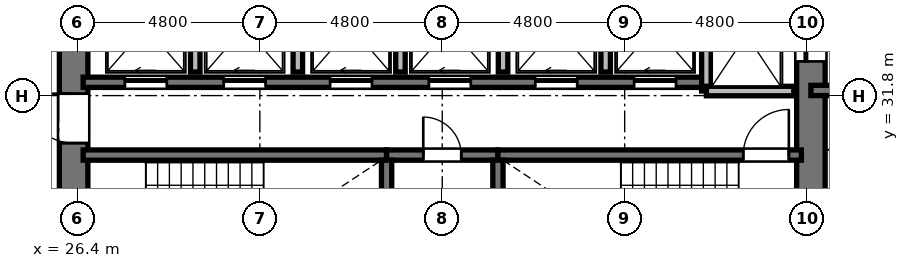
"""IFC4 building model, lengths in metres.
Left out: names, types, materials, properties, quantities, classifications, styles, units other than length and angle.
Written with IfcOpenShell. Run it as: python <this file> out.ifc"""

import sys

from ifc_helpers import new_model, si_unit, direction, frame, frame_2d, origin, place, context, subcontext, project, spatial, rectangle, extrude, element, fill, save


model = new_model("IFC4")
c1 = context("Model", 3, precision=1e-05, world=origin(), true_north=direction((0.0, 1.0)))
c2 = subcontext(c1, "Body", "Model", "MODEL_VIEW")
j1 = project(units=[si_unit("LENGTHUNIT", "METRE"), si_unit("PLANEANGLEUNIT", "RADIAN")], contexts=[c1])
p1 = place(None, origin())
s1 = spatial("IfcSite", under=j1, at=p1, CompositionType="ELEMENT")
p2 = place(p1, origin())
s2 = spatial("IfcBuilding", under=s1, at=p2, CompositionType="ELEMENT")
p3 = place(p2, frame((0.0, 0.0, 99.984)))
s3 = spatial("IfcBuildingStorey", under=s2, at=p3, CompositionType="ELEMENT", Elevation=99.984)
p4 = place(p3, frame((26.3, 20.95, 0.0), z_axis=(0.0, 0.0, 1.0), x_axis=(0.0, 1.0, 0.0)))
e1 = element("IfcWall", 1, at=p4, inside=s3, PredefinedType="SHEAR", context=c2, shape_type="SweptSolid", body=[
    extrude(rectangle(XDim=14.1, YDim=0.75, at=frame_2d((7.05, 0.0))), origin(), (0.0, 0.0, 1.0), 3.648),
])
p5 = place(p4, frame((6.5, 0.0, 0.0)))
e2 = element("IfcOpeningElement", 2, at=p5, cuts=e1, PredefinedType="OPENING", context=c2, shape_type="SweptSolid", body=[
    extrude(rectangle(XDim=1.2, YDim=2.15, at=frame_2d((0.6, 1.075))), frame((0.0, 0.385, 0.0), z_axis=(0.0, -1.0, 0.0), x_axis=(1.0, 0.0, 0.0)), (0.0, 0.0, 1.0), 0.77),
])
p6 = place(p4, frame((9.6, 0.0, 0.0)))
e3 = element("IfcOpeningElement", 3, at=p6, cuts=e1, PredefinedType="OPENING", context=c2, shape_type="SweptSolid", body=[
    extrude(rectangle(XDim=1.3, YDim=2.2, at=frame_2d((0.65, 1.1))), frame((0.0, 0.385, 0.0), z_axis=(0.0, -1.0, 0.0), x_axis=(1.0, 0.0, 0.0)), (0.0, 0.0, 1.0), 0.77),
])
p7 = place(p4, frame((3.26, 0.0, 0.0)))
e4 = element("IfcOpeningElement", 4, at=p7, cuts=e1, PredefinedType="OPENING", context=c2, shape_type="SweptSolid", body=[
    extrude(rectangle(XDim=1.3, YDim=2.2, at=frame_2d((0.65, 1.1))), frame((0.0, 0.385, 0.0), z_axis=(0.0, -1.0, 0.0), x_axis=(1.0, 0.0, 0.0)), (0.0, 0.0, 1.0), 0.77),
])
p8 = place(p3, frame((45.7, 20.95, 0.0), z_axis=(0.0, 0.0, 1.0), x_axis=(0.0, 1.0, 0.0)))
e5 = element("IfcWall", 5, at=p8, inside=s3, PredefinedType="SHEAR", context=c2, shape_type="SweptSolid", body=[
    extrude(rectangle(XDim=14.1, YDim=0.75, at=frame_2d((7.05, 0.0))), origin(), (0.0, 0.0, 1.0), 3.648),
])
p9 = place(p8, frame((11.75, 0.0, 0.0)))
e6 = element("IfcOpeningElement", 6, at=p9, cuts=e5, PredefinedType="OPENING", context=c2, shape_type="SweptSolid", body=[
    extrude(rectangle(XDim=1.4, YDim=2.3, at=frame_2d((0.7, 1.15))), frame((0.0, 0.385, 0.0), z_axis=(0.0, -1.0, 0.0), x_axis=(1.0, 0.0, 0.0)), (0.0, 0.0, 1.0), 0.77),
])
p10 = place(p8, frame((0.95, 0.0, 0.0)))
e7 = element("IfcOpeningElement", 7, at=p10, cuts=e5, PredefinedType="OPENING", context=c2, shape_type="SweptSolid", body=[
    extrude(rectangle(XDim=1.4, YDim=2.3, at=frame_2d((0.7, 1.15))), frame((0.0, 0.385, 0.0), z_axis=(0.0, -1.0, 0.0), x_axis=(1.0, 0.0, 0.0)), (0.0, 0.0, 1.0), 0.77),
])
p11 = place(p3, frame((26.55, 30.235, 0.0), z_axis=(0.0, 0.0, 1.0), x_axis=(1.0, 0.0, 0.0)))
e8 = element("IfcWall", 8, at=p11, inside=s3, PredefinedType="SHEAR", context=c2, shape_type="SweptSolid", body=[
    extrude(rectangle(XDim=7.985, YDim=0.27, at=frame_2d((3.992, 0.0))), origin(), (0.0, 0.0, 1.0), 3.648),
])
p12 = place(p3, frame((34.535, 30.235, 0.0), z_axis=(0.0, 0.0, 1.0), x_axis=(1.0, 0.0, 0.0)))
e9 = element("IfcWall", 9, at=p12, inside=s3, PredefinedType="SHEAR", context=c2, shape_type="SweptSolid", body=[
    extrude(rectangle(XDim=2.93, YDim=0.27, at=frame_2d((1.465, 0.0))), origin(), (0.0, 0.0, 1.0), 3.648),
])
p13 = place(p12, frame((0.965, 0.0, 0.0)))
e10 = element("IfcOpeningElement", 10, at=p13, cuts=e9, PredefinedType="OPENING", context=c2, shape_type="SweptSolid", body=[
    extrude(rectangle(XDim=1.0, YDim=2.1, at=frame_2d((0.5, 1.05))), frame((0.0, 0.145, 0.0), z_axis=(0.0, -1.0, 0.0), x_axis=(1.0, 0.0, 0.0)), (0.0, 0.0, 1.0), 0.29),
])
p14 = place(p3, frame((37.465, 30.235, 0.0), z_axis=(0.0, 0.0, 1.0), x_axis=(1.0, 0.0, 0.0)))
e11 = element("IfcWall", 11, at=p14, inside=s3, PredefinedType="SHEAR", context=c2, shape_type="SweptSolid", body=[
    extrude(rectangle(XDim=7.985, YDim=0.27, at=frame_2d((3.992, 0.0))), origin(), (0.0, 0.0, 1.0), 3.648),
])
p15 = place(p14, frame((6.455, 0.0, 0.0)))
e12 = element("IfcOpeningElement", 12, at=p15, cuts=e11, PredefinedType="OPENING", context=c2, shape_type="SweptSolid", body=[
    extrude(rectangle(XDim=1.2, YDim=2.15, at=frame_2d((0.6, 1.075))), frame((0.0, 0.145, 0.0), z_axis=(0.0, -1.0, 0.0), x_axis=(1.0, 0.0, 0.0)), (0.0, 0.0, 1.0), 0.29),
])
for number, where, z_axis, x_axis in (
    (13, (34.535, 26.02, 0.0), (0.0, 0.0, 1.0), (0.0, 1.0, 0.0)),
    (14, (37.465, 26.02, 0.0), (0.0, 0.0, 1.0), (0.0, 1.0, 0.0)),
):
    element("IfcWall", number, at=place(p3, frame(where, z_axis=z_axis, x_axis=x_axis)), inside=s3, PredefinedType="SHEAR", context=c2, shape_type="SweptSolid", body=[
        extrude(rectangle(XDim=4.08, YDim=0.27, at=frame_2d((2.04, 0.0))), origin(), (0.0, 0.0, 1.0), 3.648),
    ])
p16 = place(p3, frame((26.55, 32.15, 0.0), z_axis=(0.0, 0.0, 1.0), x_axis=(1.0, 0.0, 0.0)))
e15 = element("IfcWall", 15, at=p16, inside=s3, PredefinedType="SHEAR", context=c2, shape_type="SweptSolid", body=[
    extrude(rectangle(XDim=16.4, YDim=0.27, at=frame_2d((8.2, 0.0))), origin(), (0.0, 0.0, 1.0), 3.648),
])
p17 = place(p16, frame((1.1, 0.0, 0.0)))
e16 = element("IfcOpeningElement", 16, at=p17, cuts=e15, PredefinedType="OPENING", context=c2, shape_type="SweptSolid", body=[
    extrude(rectangle(XDim=1.1, YDim=2.2, at=frame_2d((0.55, 1.1))), frame((0.0, 0.145, 0.0), z_axis=(0.0, -1.0, 0.0), x_axis=(1.0, 0.0, 0.0)), (0.0, 0.0, 1.0), 0.29),
])
p18 = place(p16, frame((3.7, 0.0, 0.0)))
e17 = element("IfcOpeningElement", 17, at=p18, cuts=e15, PredefinedType="OPENING", context=c2, shape_type="SweptSolid", body=[
    extrude(rectangle(XDim=1.1, YDim=2.2, at=frame_2d((0.55, 1.1))), frame((0.0, 0.145, 0.0), z_axis=(0.0, -1.0, 0.0), x_axis=(1.0, 0.0, 0.0)), (0.0, 0.0, 1.0), 0.29),
])
p19 = place(p16, frame((6.5, 0.0, 0.0)))
e18 = element("IfcOpeningElement", 18, at=p19, cuts=e15, PredefinedType="OPENING", context=c2, shape_type="SweptSolid", body=[
    extrude(rectangle(XDim=1.1, YDim=2.2, at=frame_2d((0.55, 1.1))), frame((0.0, 0.145, 0.0), z_axis=(0.0, -1.0, 0.0), x_axis=(1.0, 0.0, 0.0)), (0.0, 0.0, 1.0), 0.29),
])
p20 = place(p16, frame((9.1, 0.0, 0.0)))
e19 = element("IfcOpeningElement", 19, at=p20, cuts=e15, PredefinedType="OPENING", context=c2, shape_type="SweptSolid", body=[
    extrude(rectangle(XDim=1.1, YDim=2.2, at=frame_2d((0.55, 1.1))), frame((0.0, 0.145, 0.0), z_axis=(0.0, -1.0, 0.0), x_axis=(1.0, 0.0, 0.0)), (0.0, 0.0, 1.0), 0.29),
])
p21 = place(p16, frame((11.9, 0.0, 0.0)))
e20 = element("IfcOpeningElement", 20, at=p21, cuts=e15, PredefinedType="OPENING", context=c2, shape_type="SweptSolid", body=[
    extrude(rectangle(XDim=1.1, YDim=2.2, at=frame_2d((0.55, 1.1))), frame((0.0, 0.145, 0.0), z_axis=(0.0, -1.0, 0.0), x_axis=(1.0, 0.0, 0.0)), (0.0, 0.0, 1.0), 0.29),
])
p22 = place(p16, frame((14.5, 0.0, 0.0)))
e21 = element("IfcOpeningElement", 21, at=p22, cuts=e15, PredefinedType="OPENING", context=c2, shape_type="SweptSolid", body=[
    extrude(rectangle(XDim=1.1, YDim=2.2, at=frame_2d((0.55, 1.1))), frame((0.0, 0.145, 0.0), z_axis=(0.0, -1.0, 0.0), x_axis=(1.0, 0.0, 0.0)), (0.0, 0.0, 1.0), 0.29),
])
p23 = place(p3, frame((42.95, 31.92, 0.0), z_axis=(0.0, 0.0, 1.0), x_axis=(0.0, 1.0, 0.0)))
e22 = element("IfcWall", 22, at=p23, inside=s3, PredefinedType="SOLIDWALL", context=c2, shape_type="SweptSolid", body=[
    extrude(rectangle(XDim=3.18, YDim=0.25, at=frame_2d((1.59, 0.0))), origin(), (0.0, 0.0, 1.0), 3.428),
])
p24 = place(p3, frame((42.95, 31.92, 0.0), z_axis=(0.0, 0.0, 1.0), x_axis=(1.0, 0.0, 0.0)))
e23 = element("IfcWall", 23, at=p24, inside=s3, PredefinedType="SOLIDWALL", context=c2, shape_type="SweptSolid", body=[
    extrude(rectangle(XDim=2.3, YDim=0.25, at=frame_2d((1.15, 0.0))), origin(), (0.0, 0.0, 1.0), 3.428),
])
for number, where, z_axis, x_axis in (
    (24, (29.5, 32.42, 0.0), (0.0, 0.0, 1.0), (0.0, 1.0, 0.0)),
    (25, (32.2, 32.42, 0.0), (0.0, 0.0, 1.0), (0.0, 1.0, 0.0)),
    (26, (34.9, 32.42, 0.0), (0.0, 0.0, 1.0), (0.0, 1.0, 0.0)),
    (27, (37.6, 32.42, 0.0), (0.0, 0.0, 1.0), (0.0, 1.0, 0.0)),
    (28, (40.3, 32.42, 0.0), (0.0, 0.0, 1.0), (0.0, 1.0, 0.0)),
):
    element("IfcWall", number, at=place(p3, frame(where, z_axis=z_axis, x_axis=x_axis)), inside=s3, PredefinedType="SOLIDWALL", context=c2, shape_type="SweptSolid", body=[
        extrude(rectangle(XDim=2.68, YDim=0.25, at=frame_2d((1.34, 0.0))), origin(), (0.0, 0.0, 1.0), 3.428),
    ])
p25 = place(p3, frame((45.7, 31.935, 0.0), z_axis=(0.0, 0.0, 1.0), x_axis=(1.0, 0.0, 0.0)))
e29 = element("IfcWall", 29, at=p25, inside=s3, PredefinedType="SHEAR", context=c2, shape_type="SweptSolid", body=[
    extrude(rectangle(XDim=4.715, YDim=0.27, at=frame_2d((2.357, 0.0))), origin(), (0.0, 0.0, 1.0), 3.648),
])
p26 = place(p15, origin())
e30 = element("IfcDoor", 30, at=p26, inside=s3, OperationType="SINGLE_SWING_RIGHT", PredefinedType="DOOR", context=c2, shape_type="SweptSolid", body=[
    extrude(rectangle(XDim=1.2, YDim=2.15, at=frame_2d((0.6, 1.075))), frame((0.0, 0.025, 0.0), z_axis=(0.0, -1.0, 0.0), x_axis=(1.0, 0.0, 0.0)), (0.0, 0.0, 1.0), 0.05),
])
fill(e12, e30)
p27 = place(p13, origin())
e31 = element("IfcDoor", 31, at=p27, inside=s3, OperationType="SINGLE_SWING_LEFT", PredefinedType="DOOR", context=c2, shape_type="SweptSolid", body=[
    extrude(rectangle(XDim=1.0, YDim=2.1, at=frame_2d((0.5, 1.05))), frame((0.0, 0.025, 0.0), z_axis=(0.0, -1.0, 0.0), x_axis=(1.0, 0.0, 0.0)), (0.0, 0.0, 1.0), 0.05),
])
fill(e10, e31)
p28 = place(p6, origin())
e32 = element("IfcDoor", 32, at=p28, inside=s3, OperationType="SINGLE_SWING_RIGHT", PredefinedType="DOOR", context=c2, shape_type="SweptSolid", body=[
    extrude(rectangle(XDim=1.3, YDim=2.2, at=frame_2d((0.65, 1.1))), frame((0.0, 0.025, 0.0), z_axis=(0.0, -1.0, 0.0), x_axis=(1.0, 0.0, 0.0)), (0.0, 0.0, 1.0), 0.05),
])
fill(e3, e32)
p29 = place(p17, origin())
e33 = element("IfcDoor", 33, at=p29, inside=s3, OperationType="SLIDING_TO_LEFT", PredefinedType="DOOR", context=c2, shape_type="SweptSolid", body=[
    extrude(rectangle(XDim=1.1, YDim=2.2, at=frame_2d((0.55, 1.1))), frame((0.0, 0.025, 0.0), z_axis=(0.0, -1.0, 0.0), x_axis=(1.0, 0.0, 0.0)), (0.0, 0.0, 1.0), 0.05),
])
fill(e16, e33)
p30 = place(p18, origin())
e34 = element("IfcDoor", 34, at=p30, inside=s3, OperationType="SLIDING_TO_LEFT", PredefinedType="DOOR", context=c2, shape_type="SweptSolid", body=[
    extrude(rectangle(XDim=1.1, YDim=2.2, at=frame_2d((0.55, 1.1))), frame((0.0, 0.025, 0.0), z_axis=(0.0, -1.0, 0.0), x_axis=(1.0, 0.0, 0.0)), (0.0, 0.0, 1.0), 0.05),
])
fill(e17, e34)
p31 = place(p19, origin())
e35 = element("IfcDoor", 35, at=p31, inside=s3, OperationType="SLIDING_TO_LEFT", PredefinedType="DOOR", context=c2, shape_type="SweptSolid", body=[
    extrude(rectangle(XDim=1.1, YDim=2.2, at=frame_2d((0.55, 1.1))), frame((0.0, 0.025, 0.0), z_axis=(0.0, -1.0, 0.0), x_axis=(1.0, 0.0, 0.0)), (0.0, 0.0, 1.0), 0.05),
])
fill(e18, e35)
p32 = place(p20, origin())
e36 = element("IfcDoor", 36, at=p32, inside=s3, OperationType="SLIDING_TO_LEFT", PredefinedType="DOOR", context=c2, shape_type="SweptSolid", body=[
    extrude(rectangle(XDim=1.1, YDim=2.2, at=frame_2d((0.55, 1.1))), frame((0.0, 0.025, 0.0), z_axis=(0.0, -1.0, 0.0), x_axis=(1.0, 0.0, 0.0)), (0.0, 0.0, 1.0), 0.05),
])
fill(e19, e36)
p33 = place(p21, origin())
e37 = element("IfcDoor", 37, at=p33, inside=s3, OperationType="SLIDING_TO_LEFT", PredefinedType="DOOR", context=c2, shape_type="SweptSolid", body=[
    extrude(rectangle(XDim=1.1, YDim=2.2, at=frame_2d((0.55, 1.1))), frame((0.0, 0.025, 0.0), z_axis=(0.0, -1.0, 0.0), x_axis=(1.0, 0.0, 0.0)), (0.0, 0.0, 1.0), 0.05),
])
fill(e20, e37)
p34 = place(p22, origin())
e38 = element("IfcDoor", 38, at=p34, inside=s3, OperationType="SLIDING_TO_LEFT", PredefinedType="DOOR", context=c2, shape_type="SweptSolid", body=[
    extrude(rectangle(XDim=1.1, YDim=2.2, at=frame_2d((0.55, 1.1))), frame((0.0, 0.025, 0.0), z_axis=(0.0, -1.0, 0.0), x_axis=(1.0, 0.0, 0.0)), (0.0, 0.0, 1.0), 0.05),
])
fill(e21, e38)
p35 = place(p9, origin())
e39 = element("IfcDoor", 39, at=p35, inside=s3, OperationType="SLIDING_TO_LEFT", PredefinedType="DOOR", context=c2, shape_type="SweptSolid", body=[
    extrude(rectangle(XDim=1.4, YDim=2.3, at=frame_2d((0.7, 1.15))), frame((0.0, 0.025, 0.0), z_axis=(0.0, -1.0, 0.0), x_axis=(1.0, 0.0, 0.0)), (0.0, 0.0, 1.0), 0.05),
])
fill(e6, e39)
save(model, sys.argv[1])
